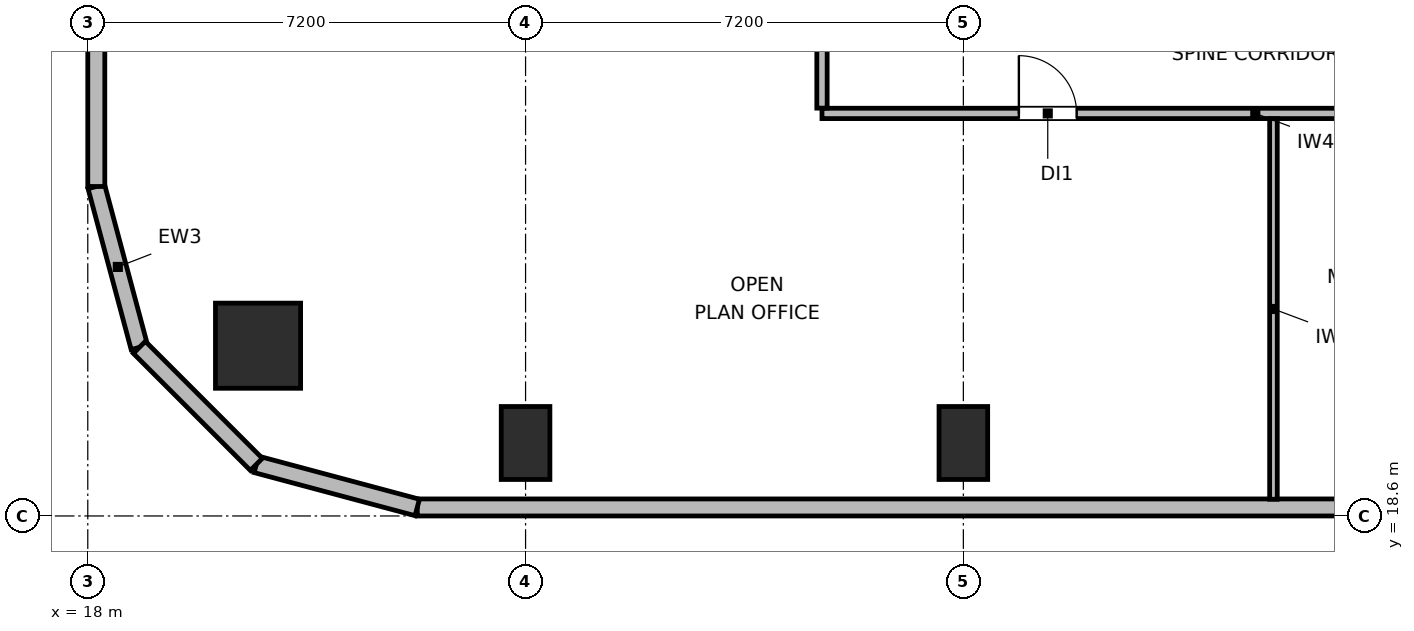
"""IFC4 building model, lengths in metres.
Left out: names, types, materials, properties, quantities, classifications, styles, units other than length and angle.
Written with IfcOpenShell. Run it as: python <this file> out.ifc"""

import sys

from ifc_helpers import new_model, si_unit, direction, frame, frame_2d, origin, origin_2d, place, context, subcontext, project, spatial, rectangle, circle, extrude, element, fill, save


model = new_model("IFC4")
c1 = context("Model", 3, precision=1e-05, world=origin(), true_north=direction((0.0, 1.0)))
c2 = subcontext(c1, "Body", "Model", "MODEL_VIEW")
j1 = project(units=[si_unit("LENGTHUNIT", "METRE"), si_unit("PLANEANGLEUNIT", "RADIAN")], contexts=[c1])
p1 = place(None, origin())
s1 = spatial("IfcSite", under=j1, at=p1, CompositionType="ELEMENT")
p2 = place(p1, origin())
s2 = spatial("IfcBuilding", under=s1, at=p2, CompositionType="ELEMENT")
p3 = place(p2, frame((0.0, 0.0, 158.4)))
s3 = spatial("IfcBuildingStorey", under=s2, at=p3, CompositionType="ELEMENT", Elevation=158.4)
p4 = place(p3, frame((20.8, 21.4, 0.0), z_axis=(0.0, 0.0, 1.0), x_axis=(1.0, 0.0, 0.0)))
e1 = element("IfcColumn", 1, at=p4, inside=s3, PredefinedType="COLUMN", context=c2, shape_type="SweptSolid", body=[
    extrude(circle(Radius=0.7, at=origin_2d()), origin(), (0.0, 0.0, 1.0), 3.9),
])
for number, where, z_axis, x_axis in (
    (2, (25.2, 19.8, 0.0), (0.0, 0.0, 1.0), (1.0, 0.0, 0.0)),
    (3, (32.4, 19.8, 0.0), (0.0, 0.0, 1.0), (1.0, 0.0, 0.0)),
):
    element("IfcColumn", number, at=place(p3, frame(where, z_axis=z_axis, x_axis=x_axis)), inside=s3, PredefinedType="COLUMN", context=c2, shape_type="SweptSolid", body=[
        extrude(rectangle(XDim=0.8, YDim=1.2, at=origin_2d()), origin(), (0.0, 0.0, 1.0), 3.9),
    ])
p5 = place(p3, frame((18.848, 21.373, 0.0), z_axis=(0.0, 0.0, 1.0), x_axis=(-0.258672222976, 0.9659651552, 0.0)))
e4 = element("IfcWall", 4, at=p5, inside=s3, PredefinedType="SOLIDWALL", context=c2, shape_type="SweptSolid", body=[
    extrude(rectangle(XDim=2.739, YDim=0.28, at=frame_2d((1.37, 0.0))), origin(), (0.0, 0.0, 1.0), 3.68),
])
p6 = place(p3, frame((18.14, 24.018, 0.0), z_axis=(0.0, 0.0, 1.0), x_axis=(0.0, 1.0, 0.0)))
e5 = element("IfcWall", 5, at=p6, inside=s3, PredefinedType="SOLIDWALL", context=c2, shape_type="SweptSolid", body=[
    extrude(rectangle(XDim=5.242, YDim=0.28, at=frame_2d((2.621, 0.0))), origin(), (0.0, 0.0, 1.0), 3.68),
])
p7 = place(p3, frame((41.36, 18.74, 0.0), z_axis=(0.0, 0.0, 1.0), x_axis=(-1.0, 0.0, 0.0)))
e6 = element("IfcWall", 6, at=p7, inside=s3, PredefinedType="SOLIDWALL", context=c2, shape_type="SweptSolid", body=[
    extrude(rectangle(XDim=17.942, YDim=0.28, at=frame_2d((8.971, 0.0))), origin(), (0.0, 0.0, 1.0), 3.68),
])
p8 = place(p3, frame((23.418, 18.74, 0.0), z_axis=(0.0, 0.0, 1.0), x_axis=(-0.965971118627, 0.258649952598, 0.0)))
e7 = element("IfcWall", 7, at=p8, inside=s3, PredefinedType="SOLIDWALL", context=c2, shape_type="SweptSolid", body=[
    extrude(rectangle(XDim=2.739, YDim=0.28, at=frame_2d((1.37, 0.0))), origin(), (0.0, 0.0, 1.0), 3.68),
])
p9 = place(p3, frame((20.772, 19.448, 0.0), z_axis=(0.0, 0.0, 1.0), x_axis=(-0.707106781187, 0.707106781187, 0.0)))
e8 = element("IfcWall", 8, at=p9, inside=s3, PredefinedType="SOLIDWALL", context=c2, shape_type="SweptSolid", body=[
    extrude(rectangle(XDim=2.721, YDim=0.28, at=frame_2d((1.36, 0.0))), origin(), (0.0, 0.0, 1.0), 3.68),
])
p10 = place(p3, frame((30.075, 25.22, 0.0), z_axis=(0.0, 0.0, 1.0), x_axis=(1.0, 0.0, 0.0)))
e9 = element("IfcWall", 9, at=p10, inside=s3, PredefinedType="PARTITIONING", context=c2, shape_type="SweptSolid", body=[
    extrude(rectangle(XDim=33.525, YDim=0.17, at=frame_2d((16.763, 0.0))), origin(), (0.0, 0.0, 1.0), 3.68),
])
p11 = place(p10, frame((3.238, 0.0, 0.0)))
e10 = element("IfcOpeningElement", 10, at=p11, cuts=e9, PredefinedType="OPENING", context=c2, shape_type="SweptSolid", body=[
    extrude(rectangle(XDim=0.95, YDim=2.04, at=frame_2d((0.475, 1.02))), frame((0.0, 0.095, 0.0), z_axis=(0.0, -1.0, 0.0), x_axis=(1.0, 0.0, 0.0)), (0.0, 0.0, 1.0), 0.19),
])
p12 = place(p10, frame((10.065, 0.0, 0.0)))
e11 = element("IfcOpeningElement", 11, at=p12, cuts=e9, PredefinedType="OPENING", context=c2, shape_type="SweptSolid", body=[
    extrude(rectangle(XDim=0.95, YDim=2.04, at=frame_2d((0.475, 1.02))), frame((0.0, 0.095, 0.0), z_axis=(0.0, -1.0, 0.0), x_axis=(1.0, 0.0, 0.0)), (0.0, 0.0, 1.0), 0.19),
])
p13 = place(p10, frame((16.29, 0.0, 0.0)))
e12 = element("IfcOpeningElement", 12, at=p13, cuts=e9, PredefinedType="OPENING", context=c2, shape_type="SweptSolid", body=[
    extrude(rectangle(XDim=0.95, YDim=2.04, at=frame_2d((0.475, 1.02))), frame((0.0, 0.095, 0.0), z_axis=(0.0, -1.0, 0.0), x_axis=(1.0, 0.0, 0.0)), (0.0, 0.0, 1.0), 0.19),
])
p14 = place(p10, frame((22.51, 0.0, 0.0)))
e13 = element("IfcOpeningElement", 13, at=p14, cuts=e9, PredefinedType="OPENING", context=c2, shape_type="SweptSolid", body=[
    extrude(rectangle(XDim=0.95, YDim=2.04, at=frame_2d((0.475, 1.02))), frame((0.0, 0.095, 0.0), z_axis=(0.0, -1.0, 0.0), x_axis=(1.0, 0.0, 0.0)), (0.0, 0.0, 1.0), 0.19),
])
p15 = place(p10, frame((29.335, 0.0, 0.0)))
e14 = element("IfcOpeningElement", 14, at=p15, cuts=e9, PredefinedType="OPENING", context=c2, shape_type="SweptSolid", body=[
    extrude(rectangle(XDim=0.95, YDim=2.04, at=frame_2d((0.475, 1.02))), frame((0.0, 0.095, 0.0), z_axis=(0.0, -1.0, 0.0), x_axis=(1.0, 0.0, 0.0)), (0.0, 0.0, 1.0), 0.19),
])
p16 = place(p3, frame((30.075, 25.307, 0.0), z_axis=(0.0, 0.0, 1.0), x_axis=(0.0, 1.0, 0.0)))
e15 = element("IfcWall", 15, at=p16, inside=s3, PredefinedType="PARTITIONING", context=c2, shape_type="SweptSolid", body=[
    extrude(rectangle(XDim=9.093, YDim=0.17, at=frame_2d((4.546, 0.0))), origin(), (0.0, 0.0, 1.0), 3.68),
])
p17 = place(p16, frame((4.028, 0.0, 0.0)))
e16 = element("IfcOpeningElement", 16, at=p17, cuts=e15, PredefinedType="OPENING", context=c2, shape_type="SweptSolid", body=[
    extrude(rectangle(XDim=0.95, YDim=2.04, at=frame_2d((0.475, 1.02))), frame((0.0, 0.095, 0.0), z_axis=(0.0, -1.0, 0.0), x_axis=(1.0, 0.0, 0.0)), (0.0, 0.0, 1.0), 0.19),
])
p18 = place(p3, frame((37.5, 18.875, 0.0), z_axis=(0.0, 0.0, 1.0), x_axis=(0.0, 1.0, 0.0)))
e17 = element("IfcWall", 17, at=p18, inside=s3, PredefinedType="PARTITIONING", context=c2, shape_type="SweptSolid", body=[
    extrude(rectangle(XDim=6.258, YDim=0.125, at=frame_2d((3.129, 0.0))), origin(), (0.0, 0.0, 1.0), 3.68),
])
p19 = place(p11, origin())
e18 = element("IfcDoor", 18, at=p19, inside=s3, OperationType="SINGLE_SWING_LEFT", PredefinedType="DOOR", context=c2, shape_type="SweptSolid", body=[
    extrude(rectangle(XDim=0.95, YDim=2.04, at=frame_2d((0.475, 1.02))), frame((0.0, 0.025, 0.0), z_axis=(0.0, -1.0, 0.0), x_axis=(1.0, 0.0, 0.0)), (0.0, 0.0, 1.0), 0.05),
])
fill(e10, e18)
save(model, sys.argv[1])
